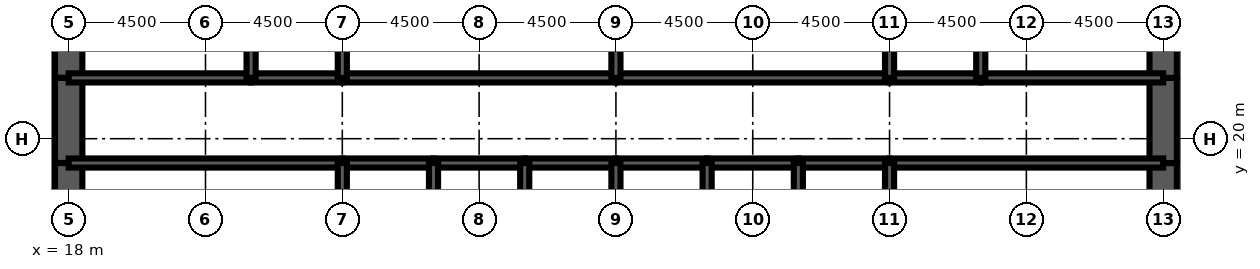
"""IFC4 building model, lengths in metres.
Left out: names, types, materials, properties, quantities, classifications, styles, units other than length and angle.
Written with IfcOpenShell. Run it as: python <this file> out.ifc"""

import sys

from ifc_helpers import new_model, si_unit, direction, frame, frame_2d, origin, place, context, subcontext, project, spatial, rectangle, extrude, element, fill, save


model = new_model("IFC4")
c1 = context("Model", 3, precision=1e-05, world=origin(), true_north=direction((0.0, 1.0)))
c2 = subcontext(c1, "Body", "Model", "MODEL_VIEW")
j1 = project(units=[si_unit("LENGTHUNIT", "METRE"), si_unit("PLANEANGLEUNIT", "RADIAN")], contexts=[c1])
p1 = place(None, origin())
s1 = spatial("IfcSite", under=j1, at=p1, CompositionType="ELEMENT")
p2 = place(p1, origin())
s2 = spatial("IfcBuilding", under=s1, at=p2, CompositionType="ELEMENT")
p3 = place(p2, frame((0.0, 0.0, 95.0)))
s3 = spatial("IfcBuildingStorey", under=s2, at=p3, CompositionType="ELEMENT", Elevation=95.0)
p4 = place(p3, frame((18.0, 26.0, 0.0), z_axis=(0.0, 0.0, 1.0), x_axis=(0.0, -1.0, 0.0)))
e1 = element("IfcWall", 1, at=p4, inside=s3, PredefinedType="SHEAR", context=c2, shape_type="SweptSolid", body=[
    extrude(rectangle(XDim=4.0, YDim=0.9, at=frame_2d((2.0, 0.0))), origin(), (0.0, 0.0, 1.0), 5.5),
])
p5 = place(p3, frame((18.0, 22.0, 0.0), z_axis=(0.0, 0.0, 1.0), x_axis=(0.0, -1.0, 0.0)))
e2 = element("IfcWall", 2, at=p5, inside=s3, PredefinedType="SHEAR", context=c2, shape_type="SweptSolid", body=[
    extrude(rectangle(XDim=2.8, YDim=0.9, at=frame_2d((1.4, 0.0))), origin(), (0.0, 0.0, 1.0), 5.5),
])
p6 = place(p5, frame((0.6, 0.0, 0.0)))
e3 = element("IfcOpeningElement", 3, at=p6, cuts=e2, PredefinedType="OPENING", context=c2, shape_type="SweptSolid", body=[
    extrude(rectangle(XDim=1.8, YDim=2.1, at=frame_2d((0.9, 1.05))), frame((0.0, 0.46, 0.0), z_axis=(0.0, -1.0, 0.0), x_axis=(1.0, 0.0, 0.0)), (0.0, 0.0, 1.0), 0.92),
])
for number, where, z_axis, x_axis in (
    (4, (18.0, 19.2, 0.0), (0.0, 0.0, 1.0), (0.0, -1.0, 0.0)),
    (5, (54.0, 16.0, 0.0), (0.0, 0.0, 1.0), (0.0, 1.0, 0.0)),
):
    element("IfcWall", number, at=place(p3, frame(where, z_axis=z_axis, x_axis=x_axis)), inside=s3, PredefinedType="SHEAR", context=c2, shape_type="SweptSolid", body=[
        extrude(rectangle(XDim=3.2, YDim=0.9, at=frame_2d((1.6, 0.0))), origin(), (0.0, 0.0, 1.0), 5.5),
    ])
p7 = place(p3, frame((54.0, 19.2, 0.0), z_axis=(0.0, 0.0, 1.0), x_axis=(0.0, 1.0, 0.0)))
e6 = element("IfcWall", 6, at=p7, inside=s3, PredefinedType="SHEAR", context=c2, shape_type="SweptSolid", body=[
    extrude(rectangle(XDim=2.8, YDim=0.9, at=frame_2d((1.4, 0.0))), origin(), (0.0, 0.0, 1.0), 5.5),
])
p8 = place(p7, frame((0.4, 0.0, 0.0)))
e7 = element("IfcOpeningElement", 7, at=p8, cuts=e6, PredefinedType="OPENING", context=c2, shape_type="SweptSolid", body=[
    extrude(rectangle(XDim=1.8, YDim=2.1, at=frame_2d((0.9, 1.05))), frame((0.0, 0.46, 0.0), z_axis=(0.0, -1.0, 0.0), x_axis=(1.0, 0.0, 0.0)), (0.0, 0.0, 1.0), 0.92),
])
p9 = place(p3, frame((54.0, 22.0, 0.0), z_axis=(0.0, 0.0, 1.0), x_axis=(0.0, 1.0, 0.0)))
e8 = element("IfcWall", 8, at=p9, inside=s3, PredefinedType="SHEAR", context=c2, shape_type="SweptSolid", body=[
    extrude(rectangle(XDim=4.0, YDim=0.9, at=frame_2d((2.0, 0.0))), origin(), (0.0, 0.0, 1.0), 5.5),
])
p10 = place(p3, frame((18.0, 19.2, 0.0), z_axis=(0.0, 0.0, 1.0), x_axis=(1.0, 0.0, 0.0)))
e9 = element("IfcWall", 9, at=p10, inside=s3, PredefinedType="SOLIDWALL", context=c2, shape_type="SweptSolid", body=[
    extrude(rectangle(XDim=9.0, YDim=0.3, at=frame_2d((4.5, 0.0))), origin(), (0.0, 0.0, 1.0), 5.5),
])
p11 = place(p10, frame((0.65, 0.0, 0.0)))
e10 = element("IfcOpeningElement", 10, at=p11, cuts=e9, PredefinedType="OPENING", context=c2, shape_type="SweptSolid", body=[
    extrude(rectangle(XDim=1.0, YDim=2.1, at=frame_2d((0.5, 1.05))), frame((0.0, 0.16, 0.0), z_axis=(0.0, -1.0, 0.0), x_axis=(1.0, 0.0, 0.0)), (0.0, 0.0, 1.0), 0.32),
])
p12 = place(p3, frame((27.0, 19.2, 0.0), z_axis=(0.0, 0.0, 1.0), x_axis=(1.0, 0.0, 0.0)))
e11 = element("IfcWall", 11, at=p12, inside=s3, PredefinedType="SOLIDWALL", context=c2, shape_type="SweptSolid", body=[
    extrude(rectangle(XDim=3.0, YDim=0.3, at=frame_2d((1.5, 0.0))), origin(), (0.0, 0.0, 1.0), 5.5),
])
p13 = place(p12, frame((0.95, 0.0, 0.0)))
e12 = element("IfcOpeningElement", 12, at=p13, cuts=e11, PredefinedType="OPENING", context=c2, shape_type="SweptSolid", body=[
    extrude(rectangle(XDim=1.1, YDim=2.2, at=frame_2d((0.55, 1.1))), frame((0.0, 0.16, 0.0), z_axis=(0.0, -1.0, 0.0), x_axis=(1.0, 0.0, 0.0)), (0.0, 0.0, 1.0), 0.32),
])
for number, where, z_axis, x_axis in (
    (13, (30.0, 19.2, 0.0), (0.0, 0.0, 1.0), (1.0, 0.0, 0.0)),
    (14, (33.0, 19.2, 0.0), (0.0, 0.0, 1.0), (1.0, 0.0, 0.0)),
    (15, (36.0, 19.2, 0.0), (0.0, 0.0, 1.0), (1.0, 0.0, 0.0)),
    (16, (39.0, 19.2, 0.0), (0.0, 0.0, 1.0), (1.0, 0.0, 0.0)),
    (17, (42.0, 19.2, 0.0), (0.0, 0.0, 1.0), (1.0, 0.0, 0.0)),
):
    element("IfcWall", number, at=place(p3, frame(where, z_axis=z_axis, x_axis=x_axis)), inside=s3, PredefinedType="SOLIDWALL", context=c2, shape_type="SweptSolid", body=[
        extrude(rectangle(XDim=3.0, YDim=0.3, at=frame_2d((1.5, 0.0))), origin(), (0.0, 0.0, 1.0), 5.5),
    ])
p14 = place(p3, frame((45.0, 19.2, 0.0), z_axis=(0.0, 0.0, 1.0), x_axis=(1.0, 0.0, 0.0)))
e18 = element("IfcWall", 18, at=p14, inside=s3, PredefinedType="SOLIDWALL", context=c2, shape_type="SweptSolid", body=[
    extrude(rectangle(XDim=9.0, YDim=0.3, at=frame_2d((4.5, 0.0))), origin(), (0.0, 0.0, 1.0), 5.5),
])
p15 = place(p14, frame((7.35, 0.0, 0.0)))
e19 = element("IfcOpeningElement", 19, at=p15, cuts=e18, PredefinedType="OPENING", context=c2, shape_type="SweptSolid", body=[
    extrude(rectangle(XDim=1.0, YDim=2.1, at=frame_2d((0.5, 1.05))), frame((0.0, 0.16, 0.0), z_axis=(0.0, -1.0, 0.0), x_axis=(1.0, 0.0, 0.0)), (0.0, 0.0, 1.0), 0.32),
])
p16 = place(p3, frame((18.0, 22.0, 0.0), z_axis=(0.0, 0.0, 1.0), x_axis=(1.0, 0.0, 0.0)))
e20 = element("IfcWall", 20, at=p16, inside=s3, PredefinedType="SOLIDWALL", context=c2, shape_type="SweptSolid", body=[
    extrude(rectangle(XDim=6.0, YDim=0.3, at=frame_2d((3.0, 0.0))), origin(), (0.0, 0.0, 1.0), 5.5),
])
p17 = place(p16, frame((2.0, 0.0, 0.0)))
e21 = element("IfcOpeningElement", 21, at=p17, cuts=e20, PredefinedType="OPENING", context=c2, shape_type="SweptSolid", body=[
    extrude(rectangle(XDim=1.0, YDim=2.1, at=frame_2d((0.5, 1.05))), frame((0.0, 0.16, 0.0), z_axis=(0.0, -1.0, 0.0), x_axis=(1.0, 0.0, 0.0)), (0.0, 0.0, 1.0), 0.32),
])
p18 = place(p3, frame((24.0, 22.0, 0.0), z_axis=(0.0, 0.0, 1.0), x_axis=(1.0, 0.0, 0.0)))
e22 = element("IfcWall", 22, at=p18, inside=s3, PredefinedType="SOLIDWALL", context=c2, shape_type="SweptSolid", body=[
    extrude(rectangle(XDim=3.0, YDim=0.3, at=frame_2d((1.5, 0.0))), origin(), (0.0, 0.0, 1.0), 5.5),
])
p19 = place(p18, frame((1.0, 0.0, 0.0)))
e23 = element("IfcOpeningElement", 23, at=p19, cuts=e22, PredefinedType="OPENING", context=c2, shape_type="SweptSolid", body=[
    extrude(rectangle(XDim=1.0, YDim=2.1, at=frame_2d((0.5, 1.05))), frame((0.0, 0.16, 0.0), z_axis=(0.0, -1.0, 0.0), x_axis=(1.0, 0.0, 0.0)), (0.0, 0.0, 1.0), 0.32),
])
p20 = place(p3, frame((27.0, 22.0, 0.0), z_axis=(0.0, 0.0, 1.0), x_axis=(1.0, 0.0, 0.0)))
e24 = element("IfcWall", 24, at=p20, inside=s3, PredefinedType="SOLIDWALL", context=c2, shape_type="SweptSolid", body=[
    extrude(rectangle(XDim=9.0, YDim=0.3, at=frame_2d((4.5, 0.0))), origin(), (0.0, 0.0, 1.0), 5.5),
])
p21 = place(p20, frame((4.0, 0.0, 0.0)))
e25 = element("IfcOpeningElement", 25, at=p21, cuts=e24, PredefinedType="OPENING", context=c2, shape_type="SweptSolid", body=[
    extrude(rectangle(XDim=1.0, YDim=2.1, at=frame_2d((0.5, 1.05))), frame((0.0, 0.16, 0.0), z_axis=(0.0, -1.0, 0.0), x_axis=(1.0, 0.0, 0.0)), (0.0, 0.0, 1.0), 0.32),
])
p22 = place(p3, frame((36.0, 22.0, 0.0), z_axis=(0.0, 0.0, 1.0), x_axis=(1.0, 0.0, 0.0)))
e26 = element("IfcWall", 26, at=p22, inside=s3, PredefinedType="SOLIDWALL", context=c2, shape_type="SweptSolid", body=[
    extrude(rectangle(XDim=9.0, YDim=0.3, at=frame_2d((4.5, 0.0))), origin(), (0.0, 0.0, 1.0), 5.5),
])
p23 = place(p22, frame((4.0, 0.0, 0.0)))
e27 = element("IfcOpeningElement", 27, at=p23, cuts=e26, PredefinedType="OPENING", context=c2, shape_type="SweptSolid", body=[
    extrude(rectangle(XDim=1.0, YDim=2.1, at=frame_2d((0.5, 1.05))), frame((0.0, 0.16, 0.0), z_axis=(0.0, -1.0, 0.0), x_axis=(1.0, 0.0, 0.0)), (0.0, 0.0, 1.0), 0.32),
])
p24 = place(p3, frame((45.0, 22.0, 0.0), z_axis=(0.0, 0.0, 1.0), x_axis=(1.0, 0.0, 0.0)))
e28 = element("IfcWall", 28, at=p24, inside=s3, PredefinedType="SOLIDWALL", context=c2, shape_type="SweptSolid", body=[
    extrude(rectangle(XDim=3.0, YDim=0.3, at=frame_2d((1.5, 0.0))), origin(), (0.0, 0.0, 1.0), 5.5),
])
p25 = place(p24, frame((1.0, 0.0, 0.0)))
e29 = element("IfcOpeningElement", 29, at=p25, cuts=e28, PredefinedType="OPENING", context=c2, shape_type="SweptSolid", body=[
    extrude(rectangle(XDim=1.0, YDim=2.1, at=frame_2d((0.5, 1.05))), frame((0.0, 0.16, 0.0), z_axis=(0.0, -1.0, 0.0), x_axis=(1.0, 0.0, 0.0)), (0.0, 0.0, 1.0), 0.32),
])
p26 = place(p3, frame((48.0, 22.0, 0.0), z_axis=(0.0, 0.0, 1.0), x_axis=(1.0, 0.0, 0.0)))
e30 = element("IfcWall", 30, at=p26, inside=s3, PredefinedType="SOLIDWALL", context=c2, shape_type="SweptSolid", body=[
    extrude(rectangle(XDim=6.0, YDim=0.3, at=frame_2d((3.0, 0.0))), origin(), (0.0, 0.0, 1.0), 5.5),
])
p27 = place(p26, frame((2.0, 0.0, 0.0)))
e31 = element("IfcOpeningElement", 31, at=p27, cuts=e30, PredefinedType="OPENING", context=c2, shape_type="SweptSolid", body=[
    extrude(rectangle(XDim=1.0, YDim=2.1, at=frame_2d((0.5, 1.05))), frame((0.0, 0.16, 0.0), z_axis=(0.0, -1.0, 0.0), x_axis=(1.0, 0.0, 0.0)), (0.0, 0.0, 1.0), 0.32),
])
p28 = place(p26, frame((4.3, 0.0, 0.0)))
e32 = element("IfcOpeningElement", 32, at=p28, cuts=e30, PredefinedType="OPENING", context=c2, shape_type="SweptSolid", body=[
    extrude(rectangle(XDim=1.0, YDim=2.1, at=frame_2d((0.5, 1.05))), frame((0.0, 0.16, 0.0), z_axis=(0.0, -1.0, 0.0), x_axis=(1.0, 0.0, 0.0)), (0.0, 0.0, 1.0), 0.32),
])
for number, where, z_axis, x_axis in (
    (33, (27.0, 16.0, 0.0), (0.0, 0.0, 1.0), (0.0, 1.0, 0.0)),
    (34, (30.0, 16.0, 0.0), (0.0, 0.0, 1.0), (0.0, 1.0, 0.0)),
    (35, (33.0, 16.0, 0.0), (0.0, 0.0, 1.0), (0.0, 1.0, 0.0)),
    (36, (36.0, 16.0, 0.0), (0.0, 0.0, 1.0), (0.0, 1.0, 0.0)),
    (37, (39.0, 16.0, 0.0), (0.0, 0.0, 1.0), (0.0, 1.0, 0.0)),
    (38, (42.0, 16.0, 0.0), (0.0, 0.0, 1.0), (0.0, 1.0, 0.0)),
    (39, (45.0, 16.0, 0.0), (0.0, 0.0, 1.0), (0.0, 1.0, 0.0)),
):
    element("IfcWall", number, at=place(p3, frame(where, z_axis=z_axis, x_axis=x_axis)), inside=s3, PredefinedType="SOLIDWALL", context=c2, shape_type="SweptSolid", body=[
        extrude(rectangle(XDim=3.2, YDim=0.3, at=frame_2d((1.6, 0.0))), origin(), (0.0, 0.0, 1.0), 5.5),
    ])
for number, where, z_axis, x_axis in (
    (40, (24.0, 22.0, 0.0), (0.0, 0.0, 1.0), (0.0, 1.0, 0.0)),
    (41, (27.0, 22.0, 0.0), (0.0, 0.0, 1.0), (0.0, 1.0, 0.0)),
    (42, (36.0, 22.0, 0.0), (0.0, 0.0, 1.0), (0.0, 1.0, 0.0)),
    (43, (45.0, 22.0, 0.0), (0.0, 0.0, 1.0), (0.0, 1.0, 0.0)),
    (44, (48.0, 22.0, 0.0), (0.0, 0.0, 1.0), (0.0, 1.0, 0.0)),
):
    element("IfcWall", number, at=place(p3, frame(where, z_axis=z_axis, x_axis=x_axis)), inside=s3, PredefinedType="SOLIDWALL", context=c2, shape_type="SweptSolid", body=[
        extrude(rectangle(XDim=4.0, YDim=0.3, at=frame_2d((2.0, 0.0))), origin(), (0.0, 0.0, 1.0), 5.5),
    ])
p29 = place(p3, frame((42.0, 22.15, 0.0), z_axis=(0.0, 0.0, 1.0), x_axis=(0.0, 1.0, 0.0)))
e45 = element("IfcWall", 45, at=p29, inside=s3, PredefinedType="PARTITIONING", context=c2, shape_type="SweptSolid", body=[
    extrude(rectangle(XDim=3.7, YDim=0.15, at=frame_2d((1.85, 0.0))), origin(), (0.0, 0.0, 1.0), 3.0),
])
p30 = place(p29, frame((2.2, 0.0, 0.0)))
e46 = element("IfcOpeningElement", 46, at=p30, cuts=e45, PredefinedType="OPENING", context=c2, shape_type="SweptSolid", body=[
    extrude(rectangle(XDim=1.0, YDim=2.1, at=frame_2d((0.5, 1.05))), frame((0.0, 0.085, 0.0), z_axis=(0.0, -1.0, 0.0), x_axis=(1.0, 0.0, 0.0)), (0.0, 0.0, 1.0), 0.17),
])
p31 = place(p3, frame((51.975, 22.15, 0.0), z_axis=(0.0, 0.0, 1.0), x_axis=(0.0, 1.0, 0.0)))
e47 = element("IfcWall", 47, at=p31, inside=s3, PredefinedType="PARTITIONING", context=c2, shape_type="SweptSolid", body=[
    extrude(rectangle(XDim=3.7, YDim=0.15, at=frame_2d((1.85, 0.0))), origin(), (0.0, 0.0, 1.0), 3.0),
])
p32 = place(p13, origin())
e48 = element("IfcDoor", 48, at=p32, inside=s3, OperationType="DOUBLE_DOOR_SLIDING", PredefinedType="USERDEFINED", context=c2, shape_type="SweptSolid", body=[
    extrude(rectangle(XDim=1.1, YDim=2.2, at=frame_2d((0.55, 1.1))), frame((0.0, 0.025, 0.0), z_axis=(0.0, -1.0, 0.0), x_axis=(1.0, 0.0, 0.0)), (0.0, 0.0, 1.0), 0.05),
])
fill(e12, e48)
p33 = place(p11, origin())
e49 = element("IfcDoor", 49, at=p33, inside=s3, OperationType="SINGLE_SWING_LEFT", PredefinedType="DOOR", context=c2, shape_type="SweptSolid", body=[
    extrude(rectangle(XDim=1.0, YDim=2.1, at=frame_2d((0.5, 1.05))), frame((0.0, 0.025, 0.0), z_axis=(0.0, -1.0, 0.0), x_axis=(1.0, 0.0, 0.0)), (0.0, 0.0, 1.0), 0.05),
])
fill(e10, e49)
p34 = place(p15, origin())
e50 = element("IfcDoor", 50, at=p34, inside=s3, OperationType="SINGLE_SWING_RIGHT", PredefinedType="DOOR", context=c2, shape_type="SweptSolid", body=[
    extrude(rectangle(XDim=1.0, YDim=2.1, at=frame_2d((0.5, 1.05))), frame((0.0, 0.025, 0.0), z_axis=(0.0, -1.0, 0.0), x_axis=(1.0, 0.0, 0.0)), (0.0, 0.0, 1.0), 0.05),
])
fill(e19, e50)
p35 = place(p6, origin())
e51 = element("IfcDoor", 51, at=p35, inside=s3, OperationType="SINGLE_SWING_LEFT", PredefinedType="DOOR", context=c2, shape_type="SweptSolid", body=[
    extrude(rectangle(XDim=1.8, YDim=2.1, at=frame_2d((0.9, 1.05))), frame((0.0, 0.45, 0.0), z_axis=(0.0, -1.0, 0.0), x_axis=(1.0, 0.0, 0.0)), (0.0, 0.0, 1.0), 0.899),
])
fill(e3, e51)
p36 = place(p8, origin())
e52 = element("IfcDoor", 52, at=p36, inside=s3, OperationType="SINGLE_SWING_LEFT", PredefinedType="DOOR", context=c2, shape_type="SweptSolid", body=[
    extrude(rectangle(XDim=1.8, YDim=2.1, at=frame_2d((0.9, 1.05))), frame((0.0, 0.45, 0.0), z_axis=(0.0, -1.0, 0.0), x_axis=(1.0, 0.0, 0.0)), (0.0, 0.0, 1.0), 0.899),
])
fill(e7, e52)
p37 = place(p17, origin())
e53 = element("IfcDoor", 53, at=p37, inside=s3, OperationType="SINGLE_SWING_LEFT", PredefinedType="DOOR", context=c2, shape_type="SweptSolid", body=[
    extrude(rectangle(XDim=1.0, YDim=2.1, at=frame_2d((0.5, 1.05))), frame((0.0, 0.025, 0.0), z_axis=(0.0, -1.0, 0.0), x_axis=(1.0, 0.0, 0.0)), (0.0, 0.0, 1.0), 0.05),
])
fill(e21, e53)
p38 = place(p19, origin())
e54 = element("IfcDoor", 54, at=p38, inside=s3, OperationType="SINGLE_SWING_LEFT", PredefinedType="DOOR", context=c2, shape_type="SweptSolid", body=[
    extrude(rectangle(XDim=1.0, YDim=2.1, at=frame_2d((0.5, 1.05))), frame((0.0, 0.025, 0.0), z_axis=(0.0, -1.0, 0.0), x_axis=(1.0, 0.0, 0.0)), (0.0, 0.0, 1.0), 0.05),
])
fill(e23, e54)
p39 = place(p21, origin())
e55 = element("IfcDoor", 55, at=p39, inside=s3, OperationType="SINGLE_SWING_LEFT", PredefinedType="DOOR", context=c2, shape_type="SweptSolid", body=[
    extrude(rectangle(XDim=1.0, YDim=2.1, at=frame_2d((0.5, 1.05))), frame((0.0, 0.025, 0.0), z_axis=(0.0, -1.0, 0.0), x_axis=(1.0, 0.0, 0.0)), (0.0, 0.0, 1.0), 0.05),
])
fill(e25, e55)
p40 = place(p23, origin())
e56 = element("IfcDoor", 56, at=p40, inside=s3, OperationType="SINGLE_SWING_LEFT", PredefinedType="DOOR", context=c2, shape_type="SweptSolid", body=[
    extrude(rectangle(XDim=1.0, YDim=2.1, at=frame_2d((0.5, 1.05))), frame((0.0, 0.025, 0.0), z_axis=(0.0, -1.0, 0.0), x_axis=(1.0, 0.0, 0.0)), (0.0, 0.0, 1.0), 0.05),
])
fill(e27, e56)
p41 = place(p25, origin())
e57 = element("IfcDoor", 57, at=p41, inside=s3, OperationType="SINGLE_SWING_LEFT", PredefinedType="DOOR", context=c2, shape_type="SweptSolid", body=[
    extrude(rectangle(XDim=1.0, YDim=2.1, at=frame_2d((0.5, 1.05))), frame((0.0, 0.025, 0.0), z_axis=(0.0, -1.0, 0.0), x_axis=(1.0, 0.0, 0.0)), (0.0, 0.0, 1.0), 0.05),
])
fill(e29, e57)
p42 = place(p27, origin())
e58 = element("IfcDoor", 58, at=p42, inside=s3, OperationType="SINGLE_SWING_LEFT", PredefinedType="DOOR", context=c2, shape_type="SweptSolid", body=[
    extrude(rectangle(XDim=1.0, YDim=2.1, at=frame_2d((0.5, 1.05))), frame((0.0, 0.025, 0.0), z_axis=(0.0, -1.0, 0.0), x_axis=(1.0, 0.0, 0.0)), (0.0, 0.0, 1.0), 0.05),
])
fill(e31, e58)
p43 = place(p28, origin())
e59 = element("IfcDoor", 59, at=p43, inside=s3, OperationType="SINGLE_SWING_RIGHT", PredefinedType="DOOR", context=c2, shape_type="SweptSolid", body=[
    extrude(rectangle(XDim=1.0, YDim=2.1, at=frame_2d((0.5, 1.05))), frame((0.0, 0.025, 0.0), z_axis=(0.0, -1.0, 0.0), x_axis=(1.0, 0.0, 0.0)), (0.0, 0.0, 1.0), 0.05),
])
fill(e32, e59)
save(model, sys.argv[1])
